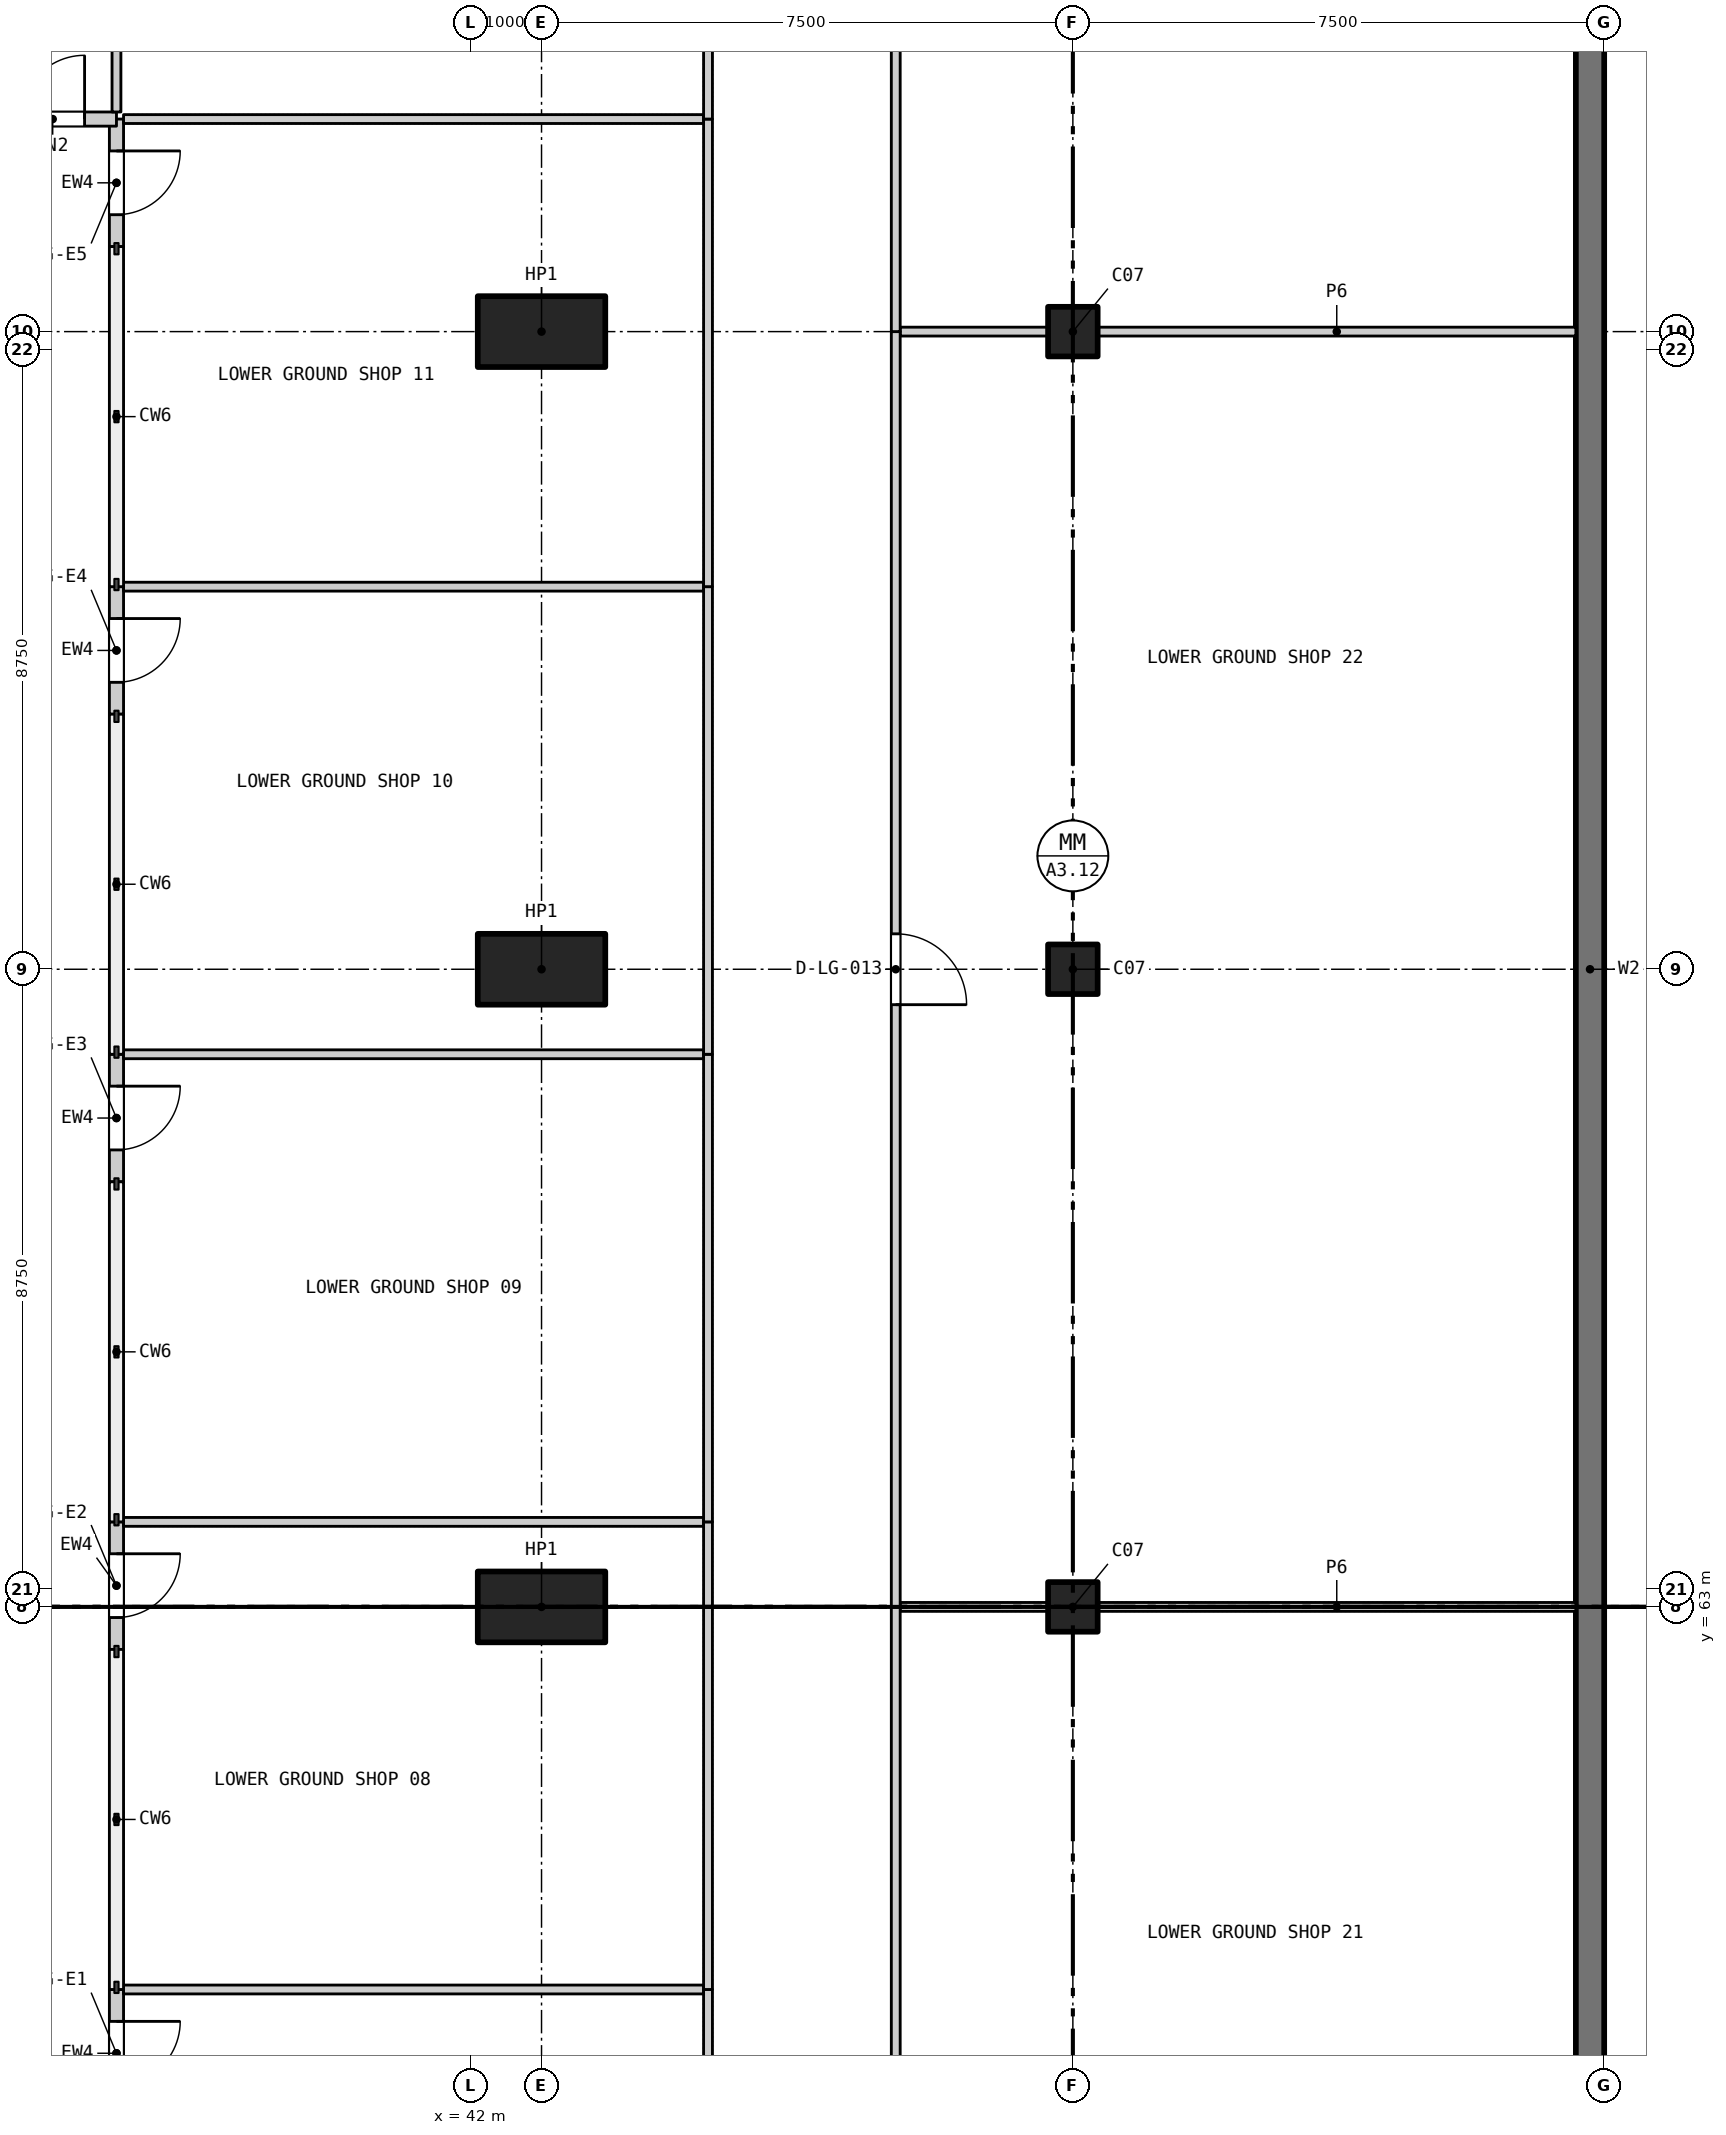
"""IFC4 building model, lengths in metres.
Left out: names, types, materials, properties, quantities, classifications, styles, units other than length and angle.
Written with IfcOpenShell. Run it as: python <this file> out.ifc"""

import sys

from ifc_helpers import new_model, si_unit, direction, frame, frame_2d, origin, origin_2d, place, context, subcontext, project, spatial, rectangle, extrude, element, fill, save


model = new_model("IFC4")
c1 = context("Model", 3, precision=1e-05, world=origin(), true_north=direction((0.0, 1.0)))
c2 = subcontext(c1, "Body", "Model", "MODEL_VIEW")
j1 = project(units=[si_unit("LENGTHUNIT", "METRE"), si_unit("PLANEANGLEUNIT", "RADIAN")], contexts=[c1])
p1 = place(None, origin())
s1 = spatial("IfcSite", under=j1, at=p1, CompositionType="ELEMENT")
p2 = place(p1, origin())
s2 = spatial("IfcBuilding", under=s1, at=p2, CompositionType="ELEMENT")
p3 = place(p2, frame((0.0, 0.0, -5.0)))
s3 = spatial("IfcBuildingStorey", under=s2, at=p3, CompositionType="ELEMENT", Elevation=-5.0)
for number, where, z_axis, x_axis in (
    (1, (50.5, 63.0, 0.0), (0.0, 0.0, 1.0), (1.0, 0.0, 0.0)),
    (2, (50.5, 72.0, 0.0), (0.0, 0.0, 1.0), (1.0, 0.0, 0.0)),
    (3, (50.5, 81.0, 0.0), (0.0, 0.0, 1.0), (1.0, 0.0, 0.0)),
):
    element("IfcColumn", number, at=place(p3, frame(where, z_axis=z_axis, x_axis=x_axis)), inside=s3, PredefinedType="COLUMN", context=c2, shape_type="SweptSolid", body=[
        extrude(rectangle(XDim=0.7, YDim=0.7, at=origin_2d()), origin(), (0.0, 0.0, 1.0), 5.0),
    ])
p4 = place(p3, frame((57.8, 18.0, 0.0), z_axis=(0.0, 0.0, 1.0), x_axis=(0.0, 1.0, 0.0)))
e4 = element("IfcWall", 4, at=p4, inside=s3, PredefinedType="SOLIDWALL", context=c2, shape_type="SweptSolid", body=[
    extrude(rectangle(XDim=108.0, YDim=0.4, at=frame_2d((54.0, 0.0))), origin(), (0.0, 0.0, 1.0), 5.0),
])
for number, where, z_axis, x_axis in (
    (5, (43.0, 63.0, 0.0), (0.0, 0.0, 1.0), (1.0, 0.0, 0.0)),
    (6, (43.0, 72.0, 0.0), (0.0, 0.0, 1.0), (1.0, 0.0, 0.0)),
    (7, (43.0, 81.0, 0.0), (0.0, 0.0, 1.0), (1.0, 0.0, 0.0)),
):
    element("IfcColumn", number, at=place(p3, frame(where, z_axis=z_axis, x_axis=x_axis)), inside=s3, PredefinedType="COLUMN", context=c2, shape_type="SweptSolid", body=[
        extrude(rectangle(XDim=1.8, YDim=1.0, at=origin_2d()), origin(), (0.0, 0.0, 1.0), 5.0),
    ])
p5 = place(p3, frame((37.0, 57.6, 0.0), z_axis=(0.0, 0.0, 1.0), x_axis=(0.0, -1.0, 0.0)))
e8 = element("IfcWall", 8, at=p5, inside=s3, PredefinedType="PARTITIONING", context=c2, shape_type="SweptSolid", body=[
    extrude(rectangle(XDim=1.8, YDim=0.2, at=frame_2d((0.9, 0.0))), origin(), (0.0, 0.0, 1.0), 4.65),
])
p6 = place(p5, frame((0.45, 0.0, 0.0)))
e9 = element("IfcOpeningElement", 9, at=p6, cuts=e8, PredefinedType="OPENING", context=c2, shape_type="SweptSolid", body=[
    extrude(rectangle(XDim=0.9, YDim=2.1, at=frame_2d((0.45, 1.05))), frame((0.0, 0.11, 0.0), z_axis=(0.0, -1.0, 0.0), x_axis=(1.0, 0.0, 0.0)), (0.0, 0.0, 1.0), 0.22),
])
p7 = place(p3, frame((37.0, 64.2, 0.0), z_axis=(0.0, 0.0, 1.0), x_axis=(0.0, -1.0, 0.0)))
e10 = element("IfcWall", 10, at=p7, inside=s3, PredefinedType="PARTITIONING", context=c2, shape_type="SweptSolid", body=[
    extrude(rectangle(XDim=1.8, YDim=0.2, at=frame_2d((0.9, 0.0))), origin(), (0.0, 0.0, 1.0), 4.65),
])
p8 = place(p7, frame((0.45, 0.0, 0.0)))
e11 = element("IfcOpeningElement", 11, at=p8, cuts=e10, PredefinedType="OPENING", context=c2, shape_type="SweptSolid", body=[
    extrude(rectangle(XDim=0.9, YDim=2.1, at=frame_2d((0.45, 1.05))), frame((0.0, 0.11, 0.0), z_axis=(0.0, -1.0, 0.0), x_axis=(1.0, 0.0, 0.0)), (0.0, 0.0, 1.0), 0.22),
])
p9 = place(p3, frame((37.0, 70.8, 0.0), z_axis=(0.0, 0.0, 1.0), x_axis=(0.0, -1.0, 0.0)))
e12 = element("IfcWall", 12, at=p9, inside=s3, PredefinedType="PARTITIONING", context=c2, shape_type="SweptSolid", body=[
    extrude(rectangle(XDim=1.8, YDim=0.2, at=frame_2d((0.9, 0.0))), origin(), (0.0, 0.0, 1.0), 4.65),
])
p10 = place(p9, frame((0.45, 0.0, 0.0)))
e13 = element("IfcOpeningElement", 13, at=p10, cuts=e12, PredefinedType="OPENING", context=c2, shape_type="SweptSolid", body=[
    extrude(rectangle(XDim=0.9, YDim=2.1, at=frame_2d((0.45, 1.05))), frame((0.0, 0.11, 0.0), z_axis=(0.0, -1.0, 0.0), x_axis=(1.0, 0.0, 0.0)), (0.0, 0.0, 1.0), 0.22),
])
p11 = place(p3, frame((37.0, 77.4, 0.0), z_axis=(0.0, 0.0, 1.0), x_axis=(0.0, -1.0, 0.0)))
e14 = element("IfcWall", 14, at=p11, inside=s3, PredefinedType="PARTITIONING", context=c2, shape_type="SweptSolid", body=[
    extrude(rectangle(XDim=1.8, YDim=0.2, at=frame_2d((0.9, 0.0))), origin(), (0.0, 0.0, 1.0), 4.65),
])
p12 = place(p11, frame((0.45, 0.0, 0.0)))
e15 = element("IfcOpeningElement", 15, at=p12, cuts=e14, PredefinedType="OPENING", context=c2, shape_type="SweptSolid", body=[
    extrude(rectangle(XDim=0.9, YDim=2.1, at=frame_2d((0.45, 1.05))), frame((0.0, 0.11, 0.0), z_axis=(0.0, -1.0, 0.0), x_axis=(1.0, 0.0, 0.0)), (0.0, 0.0, 1.0), 0.22),
])
p13 = place(p3, frame((37.0, 84.0, 0.0), z_axis=(0.0, 0.0, 1.0), x_axis=(0.0, -1.0, 0.0)))
e16 = element("IfcWall", 16, at=p13, inside=s3, PredefinedType="PARTITIONING", context=c2, shape_type="SweptSolid", body=[
    extrude(rectangle(XDim=1.8, YDim=0.2, at=frame_2d((0.9, 0.0))), origin(), (0.0, 0.0, 1.0), 4.65),
])
p14 = place(p13, frame((0.45, 0.0, 0.0)))
e17 = element("IfcOpeningElement", 17, at=p14, cuts=e16, PredefinedType="OPENING", context=c2, shape_type="SweptSolid", body=[
    extrude(rectangle(XDim=0.9, YDim=2.1, at=frame_2d((0.45, 1.05))), frame((0.0, 0.11, 0.0), z_axis=(0.0, -1.0, 0.0), x_axis=(1.0, 0.0, 0.0)), (0.0, 0.0, 1.0), 0.22),
])
p15 = place(p3, frame((35.2, 84.0, 0.0), z_axis=(0.0, 0.0, 1.0), x_axis=(1.0, 0.0, 0.0)))
e18 = element("IfcWall", 18, at=p15, inside=s3, PredefinedType="PARTITIONING", context=c2, shape_type="SweptSolid", body=[
    extrude(rectangle(XDim=1.8, YDim=0.2, at=frame_2d((0.9, 0.0))), origin(), (0.0, 0.0, 1.0), 4.65),
])
p16 = place(p15, frame((0.45, 0.0, 0.0)))
e19 = element("IfcOpeningElement", 19, at=p16, cuts=e18, PredefinedType="OPENING", context=c2, shape_type="SweptSolid", body=[
    extrude(rectangle(XDim=0.9, YDim=2.1, at=frame_2d((0.45, 1.05))), frame((0.0, 0.11, 0.0), z_axis=(0.0, -1.0, 0.0), x_axis=(1.0, 0.0, 0.0)), (0.0, 0.0, 1.0), 0.22),
])
p17 = place(p3, frame((37.1, 57.6, 0.0), z_axis=(0.0, 0.0, 1.0), x_axis=(1.0, 0.0, 0.0)))
e20 = element("IfcWall", 20, at=p17, inside=s3, PredefinedType="PARTITIONING", context=c2, shape_type="SweptSolid", body=[
    extrude(rectangle(XDim=8.188, YDim=0.125, at=frame_2d((4.094, 0.0))), origin(), (0.0, 0.0, 1.0), 4.65),
])
p18 = place(p3, frame((48.062, 63.0, 0.0), z_axis=(0.0, 0.0, 1.0), x_axis=(1.0, 0.0, 0.0)))
e21 = element("IfcWall", 21, at=p18, inside=s3, PredefinedType="PARTITIONING", context=c2, shape_type="SweptSolid", body=[
    extrude(rectangle(XDim=2.087, YDim=0.125, at=frame_2d((1.044, 0.0))), origin(), (0.0, 0.0, 1.0), 4.0),
])
p19 = place(p3, frame((50.85, 63.0, 0.0), z_axis=(0.0, 0.0, 1.0), x_axis=(1.0, 0.0, 0.0)))
e22 = element("IfcWall", 22, at=p19, inside=s3, PredefinedType="PARTITIONING", context=c2, shape_type="SweptSolid", body=[
    extrude(rectangle(XDim=6.75, YDim=0.125, at=frame_2d((3.375, 0.0))), origin(), (0.0, 0.0, 1.0), 4.0),
])
for number, where, z_axis, x_axis in (
    (23, (37.1, 64.2, 0.0), (0.0, 0.0, 1.0), (1.0, 0.0, 0.0)),
    (24, (37.1, 70.8, 0.0), (0.0, 0.0, 1.0), (1.0, 0.0, 0.0)),
    (25, (37.1, 77.4, 0.0), (0.0, 0.0, 1.0), (1.0, 0.0, 0.0)),
):
    element("IfcWall", number, at=place(p3, frame(where, z_axis=z_axis, x_axis=x_axis)), inside=s3, PredefinedType="PARTITIONING", context=c2, shape_type="SweptSolid", body=[
        extrude(rectangle(XDim=8.188, YDim=0.125, at=frame_2d((4.094, 0.0))), origin(), (0.0, 0.0, 1.0), 4.65),
    ])
p20 = place(p3, frame((48.062, 81.0, 0.0), z_axis=(0.0, 0.0, 1.0), x_axis=(1.0, 0.0, 0.0)))
e26 = element("IfcWall", 26, at=p20, inside=s3, PredefinedType="PARTITIONING", context=c2, shape_type="SweptSolid", body=[
    extrude(rectangle(XDim=2.087, YDim=0.125, at=frame_2d((1.044, 0.0))), origin(), (0.0, 0.0, 1.0), 4.0),
])
p21 = place(p3, frame((50.85, 81.0, 0.0), z_axis=(0.0, 0.0, 1.0), x_axis=(1.0, 0.0, 0.0)))
e27 = element("IfcWall", 27, at=p21, inside=s3, PredefinedType="PARTITIONING", context=c2, shape_type="SweptSolid", body=[
    extrude(rectangle(XDim=6.75, YDim=0.125, at=frame_2d((3.375, 0.0))), origin(), (0.0, 0.0, 1.0), 4.0),
])
p22 = place(p3, frame((37.1, 84.0, 0.0), z_axis=(0.0, 0.0, 1.0), x_axis=(1.0, 0.0, 0.0)))
e28 = element("IfcWall", 28, at=p22, inside=s3, PredefinedType="PARTITIONING", context=c2, shape_type="SweptSolid", body=[
    extrude(rectangle(XDim=8.188, YDim=0.125, at=frame_2d((4.094, 0.0))), origin(), (0.0, 0.0, 1.0), 4.65),
])
p23 = place(p3, frame((37.0, 84.1, 0.0), z_axis=(0.0, 0.0, 1.0), x_axis=(0.0, 1.0, 0.0)))
e29 = element("IfcWall", 29, at=p23, inside=s3, PredefinedType="PARTITIONING", context=c2, shape_type="SweptSolid", body=[
    extrude(rectangle(XDim=14.812, YDim=0.125, at=frame_2d((7.406, 0.0))), origin(), (0.0, 0.0, 1.0), 4.65),
])
p24 = place(p3, frame((45.35, 51.01, 0.0), z_axis=(0.0, 0.0, 1.0), x_axis=(0.0, 1.0, 0.0)))
e30 = element("IfcWall", 30, at=p24, inside=s3, PredefinedType="PARTITIONING", context=c2, shape_type="SweptSolid", body=[
    extrude(rectangle(XDim=6.59, YDim=0.125, at=frame_2d((3.295, 0.0))), origin(), (0.0, 0.0, 1.0), 4.65),
])
p25 = place(p3, frame((45.35, 57.6, 0.0), z_axis=(0.0, 0.0, 1.0), x_axis=(0.0, 1.0, 0.0)))
e31 = element("IfcWall", 31, at=p25, inside=s3, PredefinedType="PARTITIONING", context=c2, shape_type="SweptSolid", body=[
    extrude(rectangle(XDim=6.6, YDim=0.125, at=frame_2d((3.3, 0.0))), origin(), (0.0, 0.0, 1.0), 4.65),
])
p26 = place(p3, frame((45.35, 64.2, 0.0), z_axis=(0.0, 0.0, 1.0), x_axis=(0.0, 1.0, 0.0)))
e32 = element("IfcWall", 32, at=p26, inside=s3, PredefinedType="PARTITIONING", context=c2, shape_type="SweptSolid", body=[
    extrude(rectangle(XDim=6.6, YDim=0.125, at=frame_2d((3.3, 0.0))), origin(), (0.0, 0.0, 1.0), 4.65),
])
p27 = place(p3, frame((45.35, 70.8, 0.0), z_axis=(0.0, 0.0, 1.0), x_axis=(0.0, 1.0, 0.0)))
e33 = element("IfcWall", 33, at=p27, inside=s3, PredefinedType="PARTITIONING", context=c2, shape_type="SweptSolid", body=[
    extrude(rectangle(XDim=6.6, YDim=0.125, at=frame_2d((3.3, 0.0))), origin(), (0.0, 0.0, 1.0), 4.65),
])
p28 = place(p3, frame((45.35, 77.4, 0.0), z_axis=(0.0, 0.0, 1.0), x_axis=(0.0, 1.0, 0.0)))
e34 = element("IfcWall", 34, at=p28, inside=s3, PredefinedType="PARTITIONING", context=c2, shape_type="SweptSolid", body=[
    extrude(rectangle(XDim=6.6, YDim=0.125, at=frame_2d((3.3, 0.0))), origin(), (0.0, 0.0, 1.0), 4.65),
])
p29 = place(p3, frame((45.35, 84.0, 0.0), z_axis=(0.0, 0.0, 1.0), x_axis=(0.0, 1.0, 0.0)))
e35 = element("IfcWall", 35, at=p29, inside=s3, PredefinedType="PARTITIONING", context=c2, shape_type="SweptSolid", body=[
    extrude(rectangle(XDim=15.0, YDim=0.125, at=frame_2d((7.5, 0.0))), origin(), (0.0, 0.0, 1.0), 4.65),
])
p30 = place(p29, frame((7.0, 0.0, 0.0)))
e36 = element("IfcOpeningElement", 36, at=p30, cuts=e35, PredefinedType="OPENING", context=c2, shape_type="SweptSolid", body=[
    extrude(rectangle(XDim=1.0, YDim=2.1, at=frame_2d((0.5, 1.05))), frame((0.0, 0.073, 0.0), z_axis=(0.0, -1.0, 0.0), x_axis=(1.0, 0.0, 0.0)), (0.0, 0.0, 1.0), 0.145),
])
p31 = place(p3, frame((48.0, 45.0, 0.0), z_axis=(0.0, 0.0, 1.0), x_axis=(0.0, 1.0, 0.0)))
e37 = element("IfcWall", 37, at=p31, inside=s3, PredefinedType="PARTITIONING", context=c2, shape_type="SweptSolid", body=[
    extrude(rectangle(XDim=18.0, YDim=0.125, at=frame_2d((9.0, 0.0))), origin(), (0.0, 0.0, 1.0), 4.7),
])
p32 = place(p31, frame((8.5, 0.0, 0.0)))
e38 = element("IfcOpeningElement", 38, at=p32, cuts=e37, PredefinedType="OPENING", context=c2, shape_type="SweptSolid", body=[
    extrude(rectangle(XDim=1.0, YDim=2.1, at=frame_2d((0.5, 1.05))), frame((0.0, 0.073, 0.0), z_axis=(0.0, -1.0, 0.0), x_axis=(1.0, 0.0, 0.0)), (0.0, 0.0, 1.0), 0.145),
])
p33 = place(p3, frame((48.0, 63.0, 0.0), z_axis=(0.0, 0.0, 1.0), x_axis=(0.0, 1.0, 0.0)))
e39 = element("IfcWall", 39, at=p33, inside=s3, PredefinedType="PARTITIONING", context=c2, shape_type="SweptSolid", body=[
    extrude(rectangle(XDim=18.0, YDim=0.125, at=frame_2d((9.0, 0.0))), origin(), (0.0, 0.0, 1.0), 4.7),
])
p34 = place(p33, frame((8.5, 0.0, 0.0)))
e40 = element("IfcOpeningElement", 40, at=p34, cuts=e39, PredefinedType="OPENING", context=c2, shape_type="SweptSolid", body=[
    extrude(rectangle(XDim=1.0, YDim=2.1, at=frame_2d((0.5, 1.05))), frame((0.0, 0.073, 0.0), z_axis=(0.0, -1.0, 0.0), x_axis=(1.0, 0.0, 0.0)), (0.0, 0.0, 1.0), 0.145),
])
p35 = place(p3, frame((48.0, 81.0, 0.0), z_axis=(0.0, 0.0, 1.0), x_axis=(0.0, 1.0, 0.0)))
e41 = element("IfcWall", 41, at=p35, inside=s3, PredefinedType="PARTITIONING", context=c2, shape_type="SweptSolid", body=[
    extrude(rectangle(XDim=18.0, YDim=0.125, at=frame_2d((9.0, 0.0))), origin(), (0.0, 0.0, 1.0), 4.7),
])
p36 = place(p35, frame((8.5, 0.0, 0.0)))
e42 = element("IfcOpeningElement", 42, at=p36, cuts=e41, PredefinedType="OPENING", context=c2, shape_type="SweptSolid", body=[
    extrude(rectangle(XDim=1.0, YDim=2.1, at=frame_2d((0.5, 1.05))), frame((0.0, 0.073, 0.0), z_axis=(0.0, -1.0, 0.0), x_axis=(1.0, 0.0, 0.0)), (0.0, 0.0, 1.0), 0.145),
])
p37 = place(p6, origin())
e43 = element("IfcDoor", 43, at=p37, inside=s3, OperationType="SINGLE_SWING_LEFT", PredefinedType="DOOR", context=c2, shape_type="SweptSolid", body=[
    extrude(rectangle(XDim=0.9, YDim=2.1, at=frame_2d((0.45, 1.05))), frame((0.0, 0.025, 0.0), z_axis=(0.0, -1.0, 0.0), x_axis=(1.0, 0.0, 0.0)), (0.0, 0.0, 1.0), 0.05),
])
fill(e9, e43)
p38 = place(p8, origin())
e44 = element("IfcDoor", 44, at=p38, inside=s3, OperationType="SINGLE_SWING_LEFT", PredefinedType="DOOR", context=c2, shape_type="SweptSolid", body=[
    extrude(rectangle(XDim=0.9, YDim=2.1, at=frame_2d((0.45, 1.05))), frame((0.0, 0.025, 0.0), z_axis=(0.0, -1.0, 0.0), x_axis=(1.0, 0.0, 0.0)), (0.0, 0.0, 1.0), 0.05),
])
fill(e11, e44)
p39 = place(p10, origin())
e45 = element("IfcDoor", 45, at=p39, inside=s3, OperationType="SINGLE_SWING_LEFT", PredefinedType="DOOR", context=c2, shape_type="SweptSolid", body=[
    extrude(rectangle(XDim=0.9, YDim=2.1, at=frame_2d((0.45, 1.05))), frame((0.0, 0.025, 0.0), z_axis=(0.0, -1.0, 0.0), x_axis=(1.0, 0.0, 0.0)), (0.0, 0.0, 1.0), 0.05),
])
fill(e13, e45)
p40 = place(p12, origin())
e46 = element("IfcDoor", 46, at=p40, inside=s3, OperationType="SINGLE_SWING_LEFT", PredefinedType="DOOR", context=c2, shape_type="SweptSolid", body=[
    extrude(rectangle(XDim=0.9, YDim=2.1, at=frame_2d((0.45, 1.05))), frame((0.0, 0.025, 0.0), z_axis=(0.0, -1.0, 0.0), x_axis=(1.0, 0.0, 0.0)), (0.0, 0.0, 1.0), 0.05),
])
fill(e15, e46)
p41 = place(p14, origin())
e47 = element("IfcDoor", 47, at=p41, inside=s3, OperationType="SINGLE_SWING_LEFT", PredefinedType="DOOR", context=c2, shape_type="SweptSolid", body=[
    extrude(rectangle(XDim=0.9, YDim=2.1, at=frame_2d((0.45, 1.05))), frame((0.0, 0.025, 0.0), z_axis=(0.0, -1.0, 0.0), x_axis=(1.0, 0.0, 0.0)), (0.0, 0.0, 1.0), 0.05),
])
fill(e17, e47)
p42 = place(p16, origin())
e48 = element("IfcDoor", 48, at=p42, inside=s3, OperationType="SINGLE_SWING_RIGHT", PredefinedType="DOOR", context=c2, shape_type="SweptSolid", body=[
    extrude(rectangle(XDim=0.9, YDim=2.1, at=frame_2d((0.45, 1.05))), frame((0.0, 0.025, 0.0), z_axis=(0.0, -1.0, 0.0), x_axis=(1.0, 0.0, 0.0)), (0.0, 0.0, 1.0), 0.05),
])
fill(e19, e48)
p43 = place(p34, frame((1.0, 0.0, 0.0), z_axis=(0.0, 0.0, 1.0), x_axis=(-1.0, 0.0, 0.0)))
e49 = element("IfcDoor", 49, at=p43, inside=s3, OperationType="SINGLE_SWING_RIGHT", PredefinedType="DOOR", context=c2, shape_type="SweptSolid", body=[
    extrude(rectangle(XDim=1.0, YDim=2.1, at=frame_2d((0.5, 1.05))), frame((0.0, 0.025, 0.0), z_axis=(0.0, -1.0, 0.0), x_axis=(1.0, 0.0, 0.0)), (0.0, 0.0, 1.0), 0.05),
])
fill(e40, e49)
save(model, sys.argv[1])
